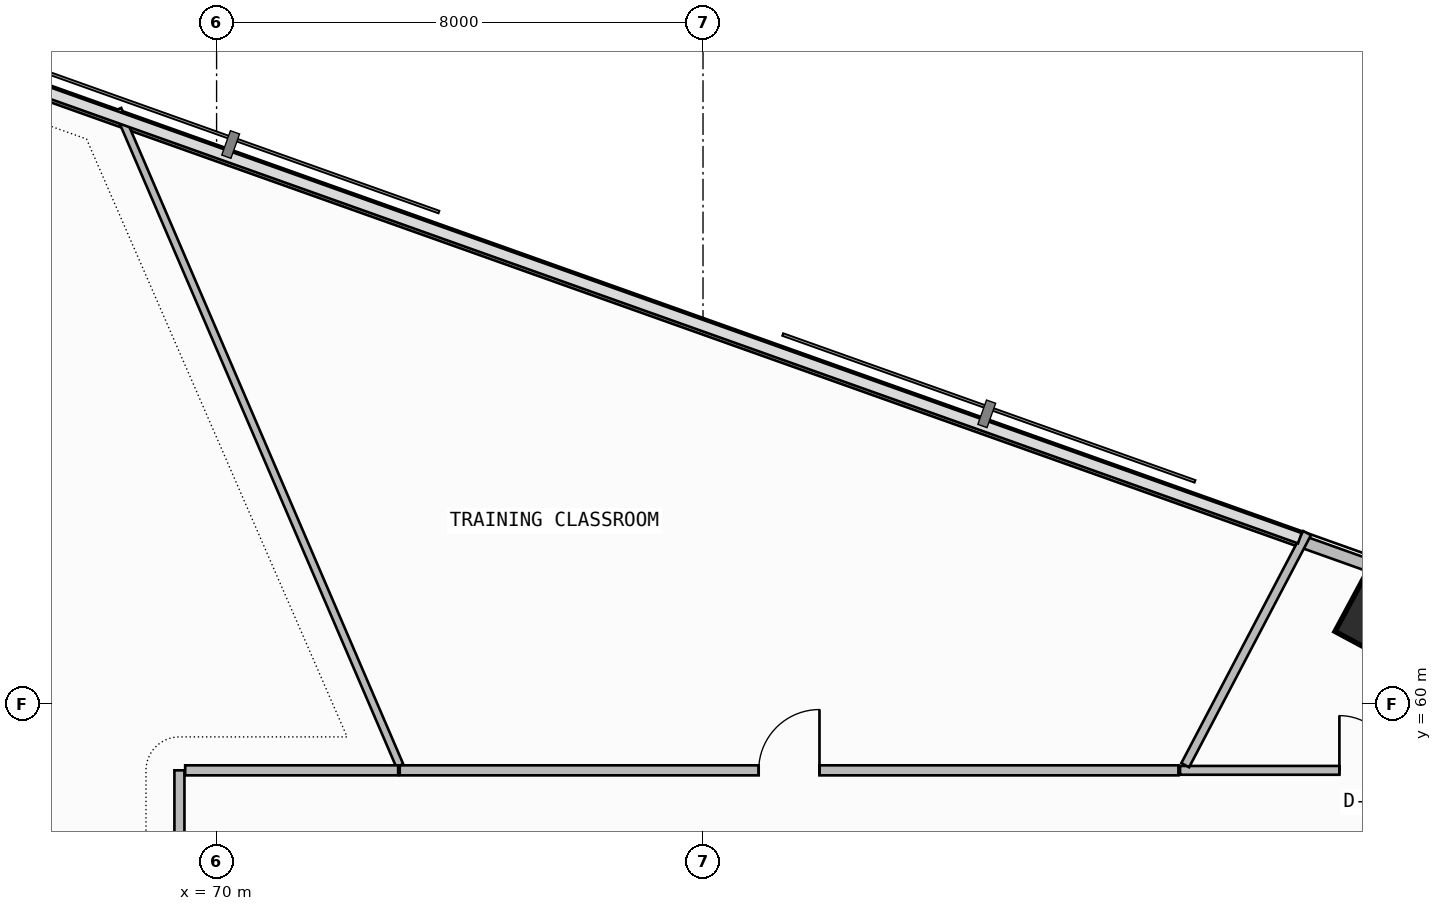
"""IFC4 building model, lengths in metres.
Left out: names, types, materials, properties, quantities, classifications, styles, units other than length and angle.
Written with IfcOpenShell. Run it as: python <this file> out.ifc"""

import sys

from ifc_helpers import new_model, si_unit, direction, frame, frame_2d, origin, origin_2d, place, context, subcontext, project, spatial, rectangle, extrude, element, fill, save


model = new_model("IFC4")
c1 = context("Model", 3, precision=1e-05, world=origin(), true_north=direction((0.0, 1.0)))
c2 = subcontext(c1, "Body", "Model", "MODEL_VIEW")
j1 = project(units=[si_unit("LENGTHUNIT", "METRE"), si_unit("PLANEANGLEUNIT", "RADIAN")], contexts=[c1])
p1 = place(None, origin())
s1 = spatial("IfcSite", under=j1, at=p1, CompositionType="ELEMENT")
p2 = place(p1, origin())
s2 = spatial("IfcBuilding", under=s1, at=p2, CompositionType="ELEMENT")
p3 = place(p2, frame((0.0, 0.0, 135.9)))
s3 = spatial("IfcBuildingStorey", under=s2, at=p3, CompositionType="ELEMENT", Elevation=135.9)
p4 = place(p3, frame((89.207, 61.438, 0.0), z_axis=(0.0, 0.0, 1.0), x_axis=(0.473319667185, 0.880890738205, 0.0)))
e1 = element("IfcColumn", 1, at=p4, inside=s3, PredefinedType="COLUMN", context=c2, shape_type="SweptSolid", body=[
    extrude(rectangle(XDim=1.2, YDim=1.2, at=origin_2d()), origin(), (0.0, 0.0, 1.0), 3.6),
])
p5 = place(p3, frame((89.368, 62.13, 0.0), z_axis=(0.0, 0.0, 1.0), x_axis=(-0.942033439765, 0.335518998515, 0.0)))
e2 = element("IfcWall", 2, at=p5, inside=s3, PredefinedType="PARAPET", context=c2, shape_type="SweptSolid", body=[
    extrude(rectangle(XDim=27.969, YDim=0.2, at=frame_2d((13.985, 0.0))), origin(), (0.0, 0.0, 1.0), 1.15),
])
p6 = place(p3, frame((94.061, 58.909, 0.0), z_axis=(0.0, 0.0, 1.0), x_axis=(-1.0, 0.0, 0.0)))
e3 = element("IfcWall", 3, at=p6, inside=s3, PredefinedType="PARTITIONING", context=c2, shape_type="SweptSolid", body=[
    extrude(rectangle(XDim=8.216, YDim=0.145, at=frame_2d((4.108, 0.0))), origin(), (0.0, 0.0, 1.0), 2.725),
])
p7 = place(p6, frame((4.695, 0.0, 0.0)))
e4 = element("IfcOpeningElement", 4, at=p7, cuts=e3, PredefinedType="OPENING", context=c2, shape_type="SweptSolid", body=[
    extrude(rectangle(XDim=0.9, YDim=2.1, at=frame_2d((0.45, 1.05))), frame((0.0, 0.083, 0.0), z_axis=(0.0, -1.0, 0.0), x_axis=(1.0, 0.0, 0.0)), (0.0, 0.0, 1.0), 0.165),
])
p8 = place(p3, frame((85.93, 58.993, 0.0), z_axis=(0.0, 0.0, 1.0), x_axis=(0.464726248664, 0.885454410912, 0.0)))
e5 = element("IfcWall", 5, at=p8, inside=s3, PredefinedType="PARTITIONING", context=c2, shape_type="SweptSolid", body=[
    extrude(rectangle(XDim=4.312, YDim=0.145, at=frame_2d((2.156, 0.0))), origin(), (0.0, 0.0, 1.0), 3.34),
])
p9 = place(p3, frame((85.818, 58.909, 0.0), z_axis=(0.0, 0.0, 1.0), x_axis=(-1.0, 0.0, 0.0)))
e6 = element("IfcWall", 6, at=p9, inside=s3, PredefinedType="PARTITIONING", context=c2, shape_type="SweptSolid", body=[
    extrude(rectangle(XDim=12.806, YDim=0.165, at=frame_2d((6.403, 0.0))), origin(), (0.0, 0.0, 1.0), 3.34),
])
p10 = place(p9, frame((5.903, 0.0, 0.0)))
e7 = element("IfcOpeningElement", 7, at=p10, cuts=e6, PredefinedType="OPENING", context=c2, shape_type="SweptSolid", body=[
    extrude(rectangle(XDim=1.0, YDim=2.2, at=frame_2d((0.5, 1.1))), frame((0.0, 0.093, 0.0), z_axis=(0.0, -1.0, 0.0), x_axis=(1.0, 0.0, 0.0)), (0.0, 0.0, 1.0), 0.185),
])
p11 = place(p3, frame((73.012, 58.987, 0.0), z_axis=(0.0, 0.0, 1.0), x_axis=(-0.394910032607, 0.918719797406, 0.0)))
e8 = element("IfcWall", 8, at=p11, inside=s3, PredefinedType="PARTITIONING", context=c2, shape_type="SweptSolid", body=[
    extrude(rectangle(XDim=11.745, YDim=0.125, at=frame_2d((5.873, 0.0))), origin(), (0.0, 0.0, 1.0), 3.34),
])
p12 = place(p3, frame((69.389, 58.909, 0.0), z_axis=(0.0, 0.0, 1.0), x_axis=(0.0, -1.0, 0.0)))
e9 = element("IfcWall", 9, at=p12, inside=s3, PredefinedType="PARTITIONING", context=c2, shape_type="SweptSolid", body=[
    extrude(rectangle(XDim=6.935, YDim=0.165, at=frame_2d((3.467, 0.0))), origin(), (0.0, 0.0, 1.0), 2.725),
])
p13 = place(p12, frame((2.967, 0.0, 0.0)))
e10 = element("IfcOpeningElement", 10, at=p13, cuts=e9, PredefinedType="OPENING", context=c2, shape_type="SweptSolid", body=[
    extrude(rectangle(XDim=1.0, YDim=2.2, at=frame_2d((0.5, 1.1))), frame((0.0, 0.093, 0.0), z_axis=(0.0, -1.0, 0.0), x_axis=(1.0, 0.0, 0.0)), (0.0, 0.0, 1.0), 0.185),
])
p14 = place(p3, frame((72.986, 58.909, 0.0), z_axis=(0.0, 0.0, 1.0), x_axis=(-1.0, 0.0, 0.0)))
e11 = element("IfcWall", 11, at=p14, inside=s3, PredefinedType="PARTITIONING", context=c2, shape_type="SweptSolid", body=[
    extrude(rectangle(XDim=3.503, YDim=0.165, at=frame_2d((1.751, 0.0))), origin(), (0.0, 0.0, 1.0), 2.725),
])
p15 = place(p3, frame((69.294, 52.081, 0.0), z_axis=(0.0, 0.0, 1.0), x_axis=(-0.832263553601, 0.554380174021, 0.0)))
e12 = element("IfcWall", 12, at=p15, inside=s3, PredefinedType="PARTITIONING", context=c2, shape_type="SweptSolid", body=[
    extrude(rectangle(XDim=12.501, YDim=0.125, at=frame_2d((6.25, 0.0))), origin(), (0.0, 0.0, 1.0), 2.725),
])
p16 = place(p7, frame((0.9, 0.0, 0.0), z_axis=(0.0, 0.0, 1.0), x_axis=(-1.0, 0.0, 0.0)))
e13 = element("IfcDoor", 13, at=p16, inside=s3, OperationType="SINGLE_SWING_LEFT", PredefinedType="DOOR", context=c2, shape_type="SweptSolid", body=[
    extrude(rectangle(XDim=0.9, YDim=2.1, at=frame_2d((0.45, 1.05))), frame((0.0, 0.025, 0.0), z_axis=(0.0, -1.0, 0.0), x_axis=(1.0, 0.0, 0.0)), (0.0, 0.0, 1.0), 0.05),
])
fill(e4, e13)
p17 = place(p10, frame((1.0, 0.0, 0.0), z_axis=(0.0, 0.0, 1.0), x_axis=(-1.0, 0.0, 0.0)))
e14 = element("IfcDoor", 14, at=p17, inside=s3, OperationType="SINGLE_SWING_RIGHT", PredefinedType="DOOR", context=c2, shape_type="SweptSolid", body=[
    extrude(rectangle(XDim=1.0, YDim=2.2, at=frame_2d((0.5, 1.1))), frame((0.0, 0.025, 0.0), z_axis=(0.0, -1.0, 0.0), x_axis=(1.0, 0.0, 0.0)), (0.0, 0.0, 1.0), 0.05),
])
fill(e7, e14)
save(model, sys.argv[1])
